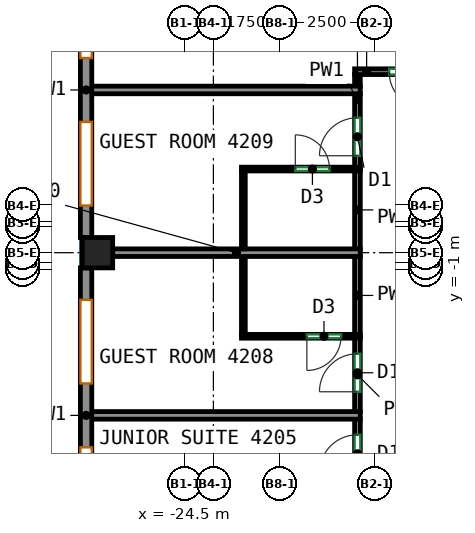
"""IFC4 building model, lengths in metres.
Left out: names, types, materials, properties, quantities, classifications, styles, units other than length and angle.
Written with IfcOpenShell. Run it as: python <this file> out.ifc"""

import sys

from ifc_helpers import new_model, si_unit, direction, frame, frame_2d, origin, origin_2d, place, context, subcontext, project, spatial, rectangle, extrude, source, transform, mapped, element, fill, save


model = new_model("IFC4")
c1 = context("Model", 3, precision=1e-05, world=origin(), true_north=direction((0.0, 1.0)))
c2 = subcontext(c1, "Body", "Model", "MODEL_VIEW")
j1 = project(units=[si_unit("LENGTHUNIT", "METRE"), si_unit("PLANEANGLEUNIT", "RADIAN")], contexts=[c1])
p1 = place(None, origin())
s1 = spatial("IfcSite", under=j1, at=p1, CompositionType="ELEMENT")
p2 = place(p1, origin())
s2 = spatial("IfcBuilding", under=s1, at=p2, CompositionType="ELEMENT")
p3 = place(p2, frame((0.0, 0.0, 178.7)))
s3 = spatial("IfcBuildingStorey", under=s2, at=p3, CompositionType="ELEMENT", Elevation=178.7)
m1 = source(origin(), c2, "Body", "SweptSolid", [
    extrude(rectangle(XDim=0.8, YDim=0.8, at=origin_2d()), origin(), (0.0, 0.0, 1.0), 3.12),
])
p4 = place(p3, frame((-26.8, -0.562, 0.0), z_axis=(0.0, 0.0, 1.0), x_axis=(1.0, 0.0, 0.0)))
e1 = element("IfcColumn", 1, at=p4, inside=s3, PredefinedType="COLUMN", context=c2, shape_type="MappedRepresentation", body=[
    mapped(m1, transform((0.0, 0.0, 0.0))),
])
m2 = source(origin(), c2, "Body", "SweptSolid", [
    extrude(rectangle(XDim=7.763, YDim=0.3, at=frame_2d((3.881, 0.0))), origin(), (0.0, 0.0, 1.0), 3.12),
])
p5 = place(p3, frame((-27.1, 7.6, 0.0), z_axis=(0.0, 0.0, 1.0), x_axis=(0.0, -1.0, 0.0)))
e2 = element("IfcWall", 2, at=p5, inside=s3, PredefinedType="SOLIDWALL", context=c2, shape_type="MappedRepresentation", body=[
    mapped(m2, transform((0.0, 0.0, 0.0))),
])
p6 = place(p5, frame((0.841, 0.0, 0.85)))
e3 = element("IfcOpeningElement", 3, at=p6, cuts=e2, PredefinedType="OPENING", context=c2, shape_type="SweptSolid", body=[
    extrude(rectangle(XDim=2.2, YDim=1.95, at=frame_2d((1.1, 0.975))), frame((0.0, 0.16, 0.0), z_axis=(0.0, -1.0, 0.0), x_axis=(1.0, 0.0, 0.0)), (0.0, 0.0, 1.0), 0.32),
])
p7 = place(p5, frame((4.722, 0.0, 0.85)))
e4 = element("IfcOpeningElement", 4, at=p7, cuts=e2, PredefinedType="OPENING", context=c2, shape_type="SweptSolid", body=[
    extrude(rectangle(XDim=2.2, YDim=1.95, at=frame_2d((1.1, 0.975))), frame((0.0, 0.16, 0.0), z_axis=(0.0, -1.0, 0.0), x_axis=(1.0, 0.0, 0.0)), (0.0, 0.0, 1.0), 0.32),
])
p8 = place(p3, frame((-27.1, -0.962, 0.0), z_axis=(0.0, 0.0, 1.0), x_axis=(0.0, -1.0, 0.0)))
e5 = element("IfcWall", 5, at=p8, inside=s3, PredefinedType="SOLIDWALL", context=c2, shape_type="MappedRepresentation", body=[
    mapped(m2, transform((0.0, 0.0, 0.0))),
])
p9 = place(p8, frame((0.841, 0.0, 0.85)))
e6 = element("IfcOpeningElement", 6, at=p9, cuts=e5, PredefinedType="OPENING", context=c2, shape_type="SweptSolid", body=[
    extrude(rectangle(XDim=2.2, YDim=1.95, at=frame_2d((1.1, 0.975))), frame((0.0, 0.16, 0.0), z_axis=(0.0, -1.0, 0.0), x_axis=(1.0, 0.0, 0.0)), (0.0, 0.0, 1.0), 0.32),
])
p10 = place(p8, frame((4.722, 0.0, 0.85)))
e7 = element("IfcOpeningElement", 7, at=p10, cuts=e5, PredefinedType="OPENING", context=c2, shape_type="SweptSolid", body=[
    extrude(rectangle(XDim=2.2, YDim=1.95, at=frame_2d((1.1, 0.975))), frame((0.0, 0.16, 0.0), z_axis=(0.0, -1.0, 0.0), x_axis=(1.0, 0.0, 0.0)), (0.0, 0.0, 1.0), 0.32),
])
p11 = place(p3, frame((-19.959, -6.885, 0.0), z_axis=(0.0, 0.0, 1.0), x_axis=(0.0, 1.0, 0.0)))
e8 = element("IfcWall", 8, at=p11, inside=s3, PredefinedType="PARTITIONING", context=c2, shape_type="SweptSolid", body=[
    extrude(rectangle(XDim=1.952, YDim=0.15, at=frame_2d((0.976, 0.0))), origin(), (0.0, 0.0, 1.0), 3.12),
])
p12 = place(p11, frame((0.531, 0.0, 0.0)))
e9 = element("IfcOpeningElement", 9, at=p12, cuts=e8, PredefinedType="OPENING", context=c2, shape_type="SweptSolid", body=[
    extrude(rectangle(XDim=1.0, YDim=2.1, at=frame_2d((0.5, 1.05))), frame((0.0, 0.085, 0.0), z_axis=(0.0, -1.0, 0.0), x_axis=(1.0, 0.0, 0.0)), (0.0, 0.0, 1.0), 0.17),
])
p13 = place(p3, frame((-19.959, -4.753, 0.0), z_axis=(0.0, 0.0, 1.0), x_axis=(0.0, 1.0, 0.0)))
e10 = element("IfcWall", 10, at=p13, inside=s3, PredefinedType="PARTITIONING", context=c2, shape_type="SweptSolid", body=[
    extrude(rectangle(XDim=1.951, YDim=0.15, at=frame_2d((0.976, 0.0))), origin(), (0.0, 0.0, 1.0), 3.12),
])
p14 = place(p13, frame((0.531, 0.0, 0.0)))
e11 = element("IfcOpeningElement", 11, at=p14, cuts=e10, PredefinedType="OPENING", context=c2, shape_type="SweptSolid", body=[
    extrude(rectangle(XDim=1.0, YDim=2.1, at=frame_2d((0.5, 1.05))), frame((0.0, 0.085, 0.0), z_axis=(0.0, -1.0, 0.0), x_axis=(1.0, 0.0, 0.0)), (0.0, 0.0, 1.0), 0.17),
])
p15 = place(p3, frame((-19.959, -2.722, 0.0), z_axis=(0.0, 0.0, 1.0), x_axis=(0.0, 1.0, 0.0)))
e12 = element("IfcWall", 12, at=p15, inside=s3, PredefinedType="PARTITIONING", context=c2, shape_type="SweptSolid", body=[
    extrude(rectangle(XDim=2.07, YDim=0.15, at=frame_2d((1.035, 0.0))), origin(), (0.0, 0.0, 1.0), 3.12),
])
p16 = place(p3, frame((-19.959, 1.678, 0.0), z_axis=(0.0, 0.0, 1.0), x_axis=(0.0, 1.0, 0.0)))
e13 = element("IfcWall", 13, at=p16, inside=s3, PredefinedType="PARTITIONING", context=c2, shape_type="SweptSolid", body=[
    extrude(rectangle(XDim=1.951, YDim=0.15, at=frame_2d((0.976, 0.0))), origin(), (0.0, 0.0, 1.0), 3.12),
])
p17 = place(p16, frame((0.31, 0.0, 0.0)))
e14 = element("IfcOpeningElement", 14, at=p17, cuts=e13, PredefinedType="OPENING", context=c2, shape_type="SweptSolid", body=[
    extrude(rectangle(XDim=1.0, YDim=2.1, at=frame_2d((0.5, 1.05))), frame((0.0, 0.085, 0.0), z_axis=(0.0, -1.0, 0.0), x_axis=(1.0, 0.0, 0.0)), (0.0, 0.0, 1.0), 0.17),
])
p18 = place(p3, frame((-19.959, -0.472, 0.0), z_axis=(0.0, 0.0, 1.0), x_axis=(0.0, 1.0, 0.0)))
e15 = element("IfcWall", 15, at=p18, inside=s3, PredefinedType="PARTITIONING", context=c2, shape_type="SweptSolid", body=[
    extrude(rectangle(XDim=2.07, YDim=0.15, at=frame_2d((1.035, 0.0))), origin(), (0.0, 0.0, 1.0), 3.12),
])
p19 = place(p3, frame((-19.959, 3.809, 0.0), z_axis=(0.0, 0.0, 1.0), x_axis=(0.0, 1.0, 0.0)))
e16 = element("IfcWall", 16, at=p19, inside=s3, PredefinedType="PARTITIONING", context=c2, shape_type="SweptSolid", body=[
    extrude(rectangle(XDim=0.316, YDim=0.15, at=frame_2d((0.158, 0.0))), origin(), (0.0, 0.0, 1.0), 3.12),
])
p20 = place(p3, frame((-17.925, 4.2, 0.0), z_axis=(0.0, 0.0, 1.0), x_axis=(-1.0, 0.0, 0.0)))
e17 = element("IfcWall", 17, at=p20, inside=s3, PredefinedType="PARTITIONING", context=c2, shape_type="SweptSolid", body=[
    extrude(rectangle(XDim=2.109, YDim=0.15, at=frame_2d((1.054, 0.0))), origin(), (0.0, 0.0, 1.0), 3.12),
])
p21 = place(p20, frame((0.2, 0.0, 0.0)))
e18 = element("IfcOpeningElement", 18, at=p21, cuts=e17, PredefinedType="OPENING", context=c2, shape_type="SweptSolid", body=[
    extrude(rectangle(XDim=1.0, YDim=2.1, at=frame_2d((0.5, 1.05))), frame((0.0, 0.085, 0.0), z_axis=(0.0, -1.0, 0.0), x_axis=(1.0, 0.0, 0.0)), (0.0, 0.0, 1.0), 0.17),
])
p22 = place(p3, frame((-27.0, -4.843, 0.0), z_axis=(0.0, 0.0, 1.0), x_axis=(1.0, 0.0, 0.0)))
e19 = element("IfcWall", 19, at=p22, inside=s3, PredefinedType="PARTITIONING", context=c2, shape_type="SweptSolid", body=[
    extrude(rectangle(XDim=7.114, YDim=0.2, at=frame_2d((3.557, 0.0))), origin(), (0.0, 0.0, 1.0), 3.12),
])
p23 = place(p3, frame((-19.886, -2.762, 0.0), z_axis=(0.0, 0.0, 1.0), x_axis=(-1.0, 0.0, 0.0)))
e20 = element("IfcWall", 20, at=p23, inside=s3, PredefinedType="PARTITIONING", context=c2, shape_type="SweptSolid", body=[
    extrude(rectangle(XDim=3.125, YDim=0.1, at=frame_2d((1.562, 0.0))), origin(), (0.0, 0.0, 1.0), 3.12),
])
p24 = place(p23, frame((0.504, 0.0, 0.0)))
e21 = element("IfcOpeningElement", 21, at=p24, cuts=e20, PredefinedType="OPENING", context=c2, shape_type="SweptSolid", body=[
    extrude(rectangle(XDim=0.9, YDim=2.1, at=frame_2d((0.45, 1.05))), frame((0.0, 0.06, 0.0), z_axis=(0.0, -1.0, 0.0), x_axis=(1.0, 0.0, 0.0)), (0.0, 0.0, 1.0), 0.12),
])
p25 = place(p3, frame((-22.961, -2.712, 0.0), z_axis=(0.0, 0.0, 1.0), x_axis=(0.0, 1.0, 0.0)))
e22 = element("IfcWall", 22, at=p25, inside=s3, PredefinedType="PARTITIONING", context=c2, shape_type="SweptSolid", body=[
    extrude(rectangle(XDim=2.05, YDim=0.1, at=frame_2d((1.025, 0.0))), origin(), (0.0, 0.0, 1.0), 3.12),
])
p26 = place(p3, frame((-26.4, -0.562, 0.0), z_axis=(0.0, 0.0, 1.0), x_axis=(1.0, 0.0, 0.0)))
e23 = element("IfcWall", 23, at=p26, inside=s3, PredefinedType="PARTITIONING", context=c2, shape_type="SweptSolid", body=[
    extrude(rectangle(XDim=6.514, YDim=0.2, at=frame_2d((3.257, 0.0))), origin(), (0.0, 0.0, 1.0), 2.52),
])
p27 = place(p3, frame((-23.011, 1.638, 0.0), z_axis=(0.0, 0.0, 1.0), x_axis=(1.0, 0.0, 0.0)))
e24 = element("IfcWall", 24, at=p27, inside=s3, PredefinedType="PARTITIONING", context=c2, shape_type="SweptSolid", body=[
    extrude(rectangle(XDim=3.125, YDim=0.1, at=frame_2d((1.562, 0.0))), origin(), (0.0, 0.0, 1.0), 3.12),
])
p28 = place(p27, frame((1.417, 0.0, 0.0)))
e25 = element("IfcOpeningElement", 25, at=p28, cuts=e24, PredefinedType="OPENING", context=c2, shape_type="SweptSolid", body=[
    extrude(rectangle(XDim=0.9, YDim=2.1, at=frame_2d((0.45, 1.05))), frame((0.0, 0.06, 0.0), z_axis=(0.0, -1.0, 0.0), x_axis=(1.0, 0.0, 0.0)), (0.0, 0.0, 1.0), 0.12),
])
p29 = place(p3, frame((-22.961, -0.462, 0.0), z_axis=(0.0, 0.0, 1.0), x_axis=(0.0, 1.0, 0.0)))
e26 = element("IfcWall", 26, at=p29, inside=s3, PredefinedType="PARTITIONING", context=c2, shape_type="SweptSolid", body=[
    extrude(rectangle(XDim=2.05, YDim=0.1, at=frame_2d((1.025, 0.0))), origin(), (0.0, 0.0, 1.0), 3.12),
])
p30 = place(p3, frame((-27.0, 3.719, 0.0), z_axis=(0.0, 0.0, 1.0), x_axis=(1.0, 0.0, 0.0)))
e27 = element("IfcWall", 27, at=p30, inside=s3, PredefinedType="PARTITIONING", context=c2, shape_type="SweptSolid", body=[
    extrude(rectangle(XDim=7.114, YDim=0.2, at=frame_2d((3.557, 0.0))), origin(), (0.0, 0.0, 1.0), 3.12),
])
p31 = place(p6, origin())
e28 = element("IfcWindow", 28, at=p31, inside=s3, PartitioningType="SINGLE_PANEL", PredefinedType="WINDOW", context=c2, shape_type="SweptSolid", body=[
    extrude(rectangle(XDim=2.2, YDim=1.95, at=frame_2d((1.1, 0.975))), frame((0.0, 0.03, 0.0), z_axis=(0.0, -1.0, 0.0), x_axis=(1.0, 0.0, 0.0)), (0.0, 0.0, 1.0), 0.06),
])
fill(e3, e28)
p32 = place(p7, origin())
e29 = element("IfcWindow", 29, at=p32, inside=s3, PartitioningType="SINGLE_PANEL", PredefinedType="WINDOW", context=c2, shape_type="SweptSolid", body=[
    extrude(rectangle(XDim=2.2, YDim=1.95, at=frame_2d((1.1, 0.975))), frame((0.0, 0.03, 0.0), z_axis=(0.0, -1.0, 0.0), x_axis=(1.0, 0.0, 0.0)), (0.0, 0.0, 1.0), 0.06),
])
fill(e4, e29)
p33 = place(p9, origin())
e30 = element("IfcWindow", 30, at=p33, inside=s3, PartitioningType="SINGLE_PANEL", PredefinedType="WINDOW", context=c2, shape_type="SweptSolid", body=[
    extrude(rectangle(XDim=2.2, YDim=1.95, at=frame_2d((1.1, 0.975))), frame((0.0, 0.03, 0.0), z_axis=(0.0, -1.0, 0.0), x_axis=(1.0, 0.0, 0.0)), (0.0, 0.0, 1.0), 0.06),
])
fill(e6, e30)
p34 = place(p10, origin())
e31 = element("IfcWindow", 31, at=p34, inside=s3, PartitioningType="SINGLE_PANEL", PredefinedType="WINDOW", context=c2, shape_type="SweptSolid", body=[
    extrude(rectangle(XDim=2.2, YDim=1.95, at=frame_2d((1.1, 0.975))), frame((0.0, 0.03, 0.0), z_axis=(0.0, -1.0, 0.0), x_axis=(1.0, 0.0, 0.0)), (0.0, 0.0, 1.0), 0.06),
])
fill(e7, e31)
p35 = place(p12, origin())
e32 = element("IfcDoor", 32, at=p35, inside=s3, OperationType="SINGLE_SWING_LEFT", PredefinedType="DOOR", context=c2, shape_type="SweptSolid", body=[
    extrude(rectangle(XDim=1.0, YDim=2.1, at=frame_2d((0.5, 1.05))), frame((0.0, 0.025, 0.0), z_axis=(0.0, -1.0, 0.0), x_axis=(1.0, 0.0, 0.0)), (0.0, 0.0, 1.0), 0.05),
])
fill(e9, e32)
p36 = place(p14, origin())
e33 = element("IfcDoor", 33, at=p36, inside=s3, OperationType="SINGLE_SWING_LEFT", PredefinedType="DOOR", context=c2, shape_type="SweptSolid", body=[
    extrude(rectangle(XDim=1.0, YDim=2.1, at=frame_2d((0.5, 1.05))), frame((0.0, 0.025, 0.0), z_axis=(0.0, -1.0, 0.0), x_axis=(1.0, 0.0, 0.0)), (0.0, 0.0, 1.0), 0.05),
])
fill(e11, e33)
p37 = place(p24, origin())
e34 = element("IfcDoor", 34, at=p37, inside=s3, OperationType="SINGLE_SWING_RIGHT", PredefinedType="DOOR", context=c2, shape_type="SweptSolid", body=[
    extrude(rectangle(XDim=0.9, YDim=2.1, at=frame_2d((0.45, 1.05))), frame((0.0, 0.025, 0.0), z_axis=(0.0, -1.0, 0.0), x_axis=(1.0, 0.0, 0.0)), (0.0, 0.0, 1.0), 0.05),
])
fill(e21, e34)
p38 = place(p28, origin())
e35 = element("IfcDoor", 35, at=p38, inside=s3, OperationType="SINGLE_SWING_LEFT", PredefinedType="DOOR", context=c2, shape_type="SweptSolid", body=[
    extrude(rectangle(XDim=0.9, YDim=2.1, at=frame_2d((0.45, 1.05))), frame((0.0, 0.025, 0.0), z_axis=(0.0, -1.0, 0.0), x_axis=(1.0, 0.0, 0.0)), (0.0, 0.0, 1.0), 0.05),
])
fill(e25, e35)
p39 = place(p17, origin())
e36 = element("IfcDoor", 36, at=p39, inside=s3, OperationType="SINGLE_SWING_LEFT", PredefinedType="DOOR", context=c2, shape_type="SweptSolid", body=[
    extrude(rectangle(XDim=1.0, YDim=2.1, at=frame_2d((0.5, 1.05))), frame((0.0, 0.025, 0.0), z_axis=(0.0, -1.0, 0.0), x_axis=(1.0, 0.0, 0.0)), (0.0, 0.0, 1.0), 0.05),
])
fill(e14, e36)
p40 = place(p21, origin())
e37 = element("IfcDoor", 37, at=p40, inside=s3, OperationType="SINGLE_SWING_LEFT", PredefinedType="DOOR", context=c2, shape_type="SweptSolid", body=[
    extrude(rectangle(XDim=1.0, YDim=2.1, at=frame_2d((0.5, 1.05))), frame((0.0, 0.025, 0.0), z_axis=(0.0, -1.0, 0.0), x_axis=(1.0, 0.0, 0.0)), (0.0, 0.0, 1.0), 0.05),
])
fill(e18, e37)
save(model, sys.argv[1])
